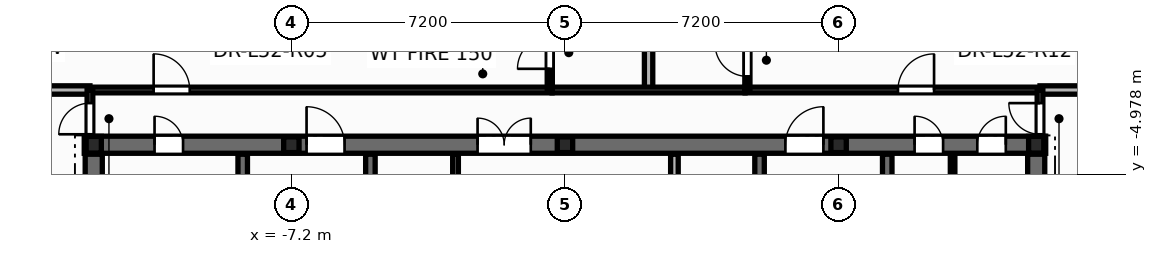
"""IFC4 building model, lengths in metres.
Left out: names, types, materials, properties, quantities, classifications, styles, units other than length and angle.
Written with IfcOpenShell. Run it as: python <this file> out.ifc"""

import sys

from ifc_helpers import new_model, si_unit, direction, frame, frame_2d, origin, origin_2d, place, context, subcontext, project, spatial, rectangle, i_section, extrude, element, fill, save


model = new_model("IFC4")
c1 = context("Model", 3, precision=1e-05, world=origin(), true_north=direction((0.0, 1.0)))
c2 = subcontext(c1, "Body", "Model", "MODEL_VIEW")
j1 = project(units=[si_unit("LENGTHUNIT", "METRE"), si_unit("PLANEANGLEUNIT", "RADIAN")], contexts=[c1])
p1 = place(None, origin())
s1 = spatial("IfcSite", under=j1, at=p1, CompositionType="ELEMENT")
p2 = place(p1, origin())
s2 = spatial("IfcBuilding", under=s1, at=p2, CompositionType="ELEMENT")
p3 = place(p2, frame((0.0, 0.0, 200.1)))
s3 = spatial("IfcBuildingStorey", under=s2, at=p3, CompositionType="ELEMENT", Elevation=200.1)
for number, where, z_axis, x_axis in (
    (1, (12.4, -4.2, 0.0), (0.0, 0.0, 1.0), (1.0, 0.0, 0.0)),
    (2, (-12.4, -4.2, 0.0), (0.0, 0.0, 1.0), (1.0, 0.0, 0.0)),
):
    element("IfcColumn", number, at=place(p3, frame(where, z_axis=z_axis, x_axis=x_axis)), inside=s3, PredefinedType="COLUMN", context=c2, shape_type="SweptSolid", body=[
        extrude(i_section(OverallWidth=0.4, OverallDepth=0.44, WebThickness=0.028, FlangeThickness=0.04, at=origin_2d()), origin(), (0.0, 0.0, 1.0), 3.6),
    ])
for number, where, z_axis, x_axis in (
    (3, (-7.2, -4.2, 0.0), (0.0, 0.0, 1.0), (1.0, 0.0, 0.0)),
    (4, (0.0, -4.2, 0.0), (0.0, 0.0, 1.0), (1.0, 0.0, 0.0)),
    (5, (7.2, -4.2, 0.0), (0.0, 0.0, 1.0), (1.0, 0.0, 0.0)),
):
    element("IfcColumn", number, at=place(p3, frame(where, z_axis=z_axis, x_axis=x_axis)), inside=s3, PredefinedType="PILASTER", context=c2, shape_type="SweptSolid", body=[
        extrude(i_section(OverallWidth=0.405, OverallDepth=0.414, WebThickness=0.022, FlangeThickness=0.032, at=origin_2d()), origin(), (0.0, 0.0, 1.0), 3.6),
    ])
p4 = place(p3, frame((-2.88, -5.6, 0.0), z_axis=(0.0, 0.0, 1.0), x_axis=(0.0, 1.0, 0.0)))
e6 = element("IfcWall", 6, at=p4, inside=s3, PredefinedType="PARTITIONING", context=c2, shape_type="SweptSolid", body=[
    extrude(rectangle(XDim=1.15, YDim=0.15, at=frame_2d((0.575, 0.0))), origin(), (0.0, 0.0, 1.0), 3.345),
])
p5 = place(p3, frame((10.2, -5.52, 0.0), z_axis=(0.0, 0.0, 1.0), x_axis=(0.0, 1.0, 0.0)))
e7 = element("IfcWall", 7, at=p5, inside=s3, PredefinedType="PARTITIONING", context=c2, shape_type="SweptSolid", body=[
    extrude(rectangle(XDim=1.12, YDim=0.12, at=frame_2d((0.56, 0.0))), origin(), (0.0, 0.0, 1.0), 3.345),
])
p6 = place(p3, frame((-12.65, -4.2, 0.0), z_axis=(0.0, 0.0, 1.0), x_axis=(1.0, 0.0, 0.0)))
e8 = element("IfcWall", 8, at=p6, inside=s3, PredefinedType="SHEAR", context=c2, shape_type="SweptSolid", body=[
    extrude(rectangle(XDim=25.3, YDim=0.45, at=frame_2d((12.65, 0.0))), origin(), (0.0, 0.0, 1.0), 3.6),
])
p7 = place(p6, frame((1.85, 0.0, 0.0)))
e9 = element("IfcOpeningElement", 9, at=p7, cuts=e8, PredefinedType="OPENING", context=c2, shape_type="SweptSolid", body=[
    extrude(rectangle(XDim=0.756, YDim=2.054, at=frame_2d((0.375, 1.027))), frame((0.0, 0.235, 0.0), z_axis=(0.0, -1.0, 0.0), x_axis=(1.0, 0.0, 0.0)), (0.0, 0.0, 1.0), 0.47),
])
p8 = place(p6, frame((21.85, 0.0, 0.0)))
e10 = element("IfcOpeningElement", 10, at=p8, cuts=e8, PredefinedType="OPENING", context=c2, shape_type="SweptSolid", body=[
    extrude(rectangle(XDim=0.756, YDim=2.054, at=frame_2d((0.375, 1.027))), frame((0.0, 0.235, 0.0), z_axis=(0.0, -1.0, 0.0), x_axis=(1.0, 0.0, 0.0)), (0.0, 0.0, 1.0), 0.47),
])
p9 = place(p6, frame((23.5, 0.0, 0.0)))
e11 = element("IfcOpeningElement", 11, at=p9, cuts=e8, PredefinedType="OPENING", context=c2, shape_type="SweptSolid", body=[
    extrude(rectangle(XDim=0.756, YDim=2.054, at=frame_2d((0.375, 1.027))), frame((0.0, 0.235, 0.0), z_axis=(0.0, -1.0, 0.0), x_axis=(1.0, 0.0, 0.0)), (0.0, 0.0, 1.0), 0.47),
])
p10 = place(p6, frame((5.85, 0.0, 0.0)))
e12 = element("IfcOpeningElement", 12, at=p10, cuts=e8, PredefinedType="OPENING", context=c2, shape_type="SweptSolid", body=[
    extrude(rectangle(XDim=1.006, YDim=2.104, at=frame_2d((0.5, 1.052))), frame((0.0, 0.235, 0.0), z_axis=(0.0, -1.0, 0.0), x_axis=(1.0, 0.0, 0.0)), (0.0, 0.0, 1.0), 0.47),
])
p11 = place(p6, frame((10.35, 0.0, 0.0)))
e13 = element("IfcOpeningElement", 13, at=p11, cuts=e8, PredefinedType="OPENING", context=c2, shape_type="SweptSolid", body=[
    extrude(rectangle(XDim=1.406, YDim=2.154, at=frame_2d((0.7, 1.077))), frame((0.0, 0.235, 0.0), z_axis=(0.0, -1.0, 0.0), x_axis=(1.0, 0.0, 0.0)), (0.0, 0.0, 1.0), 0.47),
])
p12 = place(p6, frame((18.45, 0.0, 0.0)))
e14 = element("IfcOpeningElement", 14, at=p12, cuts=e8, PredefinedType="OPENING", context=c2, shape_type="SweptSolid", body=[
    extrude(rectangle(XDim=1.006, YDim=2.104, at=frame_2d((0.5, 1.052))), frame((0.0, 0.235, 0.0), z_axis=(0.0, -1.0, 0.0), x_axis=(1.0, 0.0, 0.0)), (0.0, 0.0, 1.0), 0.47),
])
p13 = place(p3, frame((-8.48, -13.85, 0.0), z_axis=(0.0, 0.0, 1.0), x_axis=(0.0, 1.0, 0.0)))
e15 = element("IfcWall", 15, at=p13, inside=s3, PredefinedType="SHEAR", context=c2, shape_type="SweptSolid", body=[
    extrude(rectangle(XDim=9.4, YDim=0.25, at=frame_2d((4.7, 0.0))), origin(), (0.0, 0.0, 1.0), 3.6),
])
p14 = place(p13, frame((6.95, 0.0, 0.0)))
e16 = element("IfcOpeningElement", 16, at=p14, cuts=e15, PredefinedType="OPENING", context=c2, shape_type="SweptSolid", body=[
    extrude(rectangle(XDim=1.006, YDim=2.104, at=frame_2d((0.5, 1.052))), frame((0.0, 0.135, 0.0), z_axis=(0.0, -1.0, 0.0), x_axis=(1.0, 0.0, 0.0)), (0.0, 0.0, 1.0), 0.27),
])
p15 = place(p3, frame((8.48, -13.85, 0.0), z_axis=(0.0, 0.0, 1.0), x_axis=(0.0, 1.0, 0.0)))
e17 = element("IfcWall", 17, at=p15, inside=s3, PredefinedType="SHEAR", context=c2, shape_type="SweptSolid", body=[
    extrude(rectangle(XDim=9.4, YDim=0.25, at=frame_2d((4.7, 0.0))), origin(), (0.0, 0.0, 1.0), 3.6),
])
p16 = place(p15, frame((6.95, 0.0, 0.0)))
e18 = element("IfcOpeningElement", 18, at=p16, cuts=e17, PredefinedType="OPENING", context=c2, shape_type="SweptSolid", body=[
    extrude(rectangle(XDim=1.006, YDim=2.104, at=frame_2d((0.5, 1.052))), frame((0.0, 0.135, 0.0), z_axis=(0.0, -1.0, 0.0), x_axis=(1.0, 0.0, 0.0)), (0.0, 0.0, 1.0), 0.27),
])
for number, where, z_axis, x_axis in (
    (19, (-5.12, -13.85, 0.0), (0.0, 0.0, 1.0), (0.0, 1.0, 0.0)),
    (20, (5.12, -13.85, 0.0), (0.0, 0.0, 1.0), (0.0, 1.0, 0.0)),
):
    element("IfcWall", number, at=place(p3, frame(where, z_axis=z_axis, x_axis=x_axis)), inside=s3, PredefinedType="SHEAR", context=c2, shape_type="SweptSolid", body=[
        extrude(rectangle(XDim=9.4, YDim=0.25, at=frame_2d((4.7, 0.0))), origin(), (0.0, 0.0, 1.0), 3.6),
    ])
for number, where, z_axis, x_axis in (
    (21, (-12.4, -13.85, 0.0), (0.0, 0.0, 1.0), (0.0, 1.0, 0.0)),
    (22, (12.4, -13.85, 0.0), (0.0, 0.0, 1.0), (0.0, 1.0, 0.0)),
):
    element("IfcWall", number, at=place(p3, frame(where, z_axis=z_axis, x_axis=x_axis)), inside=s3, PredefinedType="SHEAR", context=c2, shape_type="SweptSolid", body=[
        extrude(rectangle(XDim=9.4, YDim=0.45, at=frame_2d((4.7, 0.0))), origin(), (0.0, 0.0, 1.0), 3.6),
    ])
p17 = place(p3, frame((2.88, -9.45, 0.0), z_axis=(0.0, 0.0, 1.0), x_axis=(0.0, 1.0, 0.0)))
e23 = element("IfcWall", 23, at=p17, inside=s3, PredefinedType="SOLIDWALL", context=c2, shape_type="SweptSolid", body=[
    extrude(rectangle(XDim=5.0, YDim=0.2, at=frame_2d((2.5, 0.0))), origin(), (0.0, 0.0, 1.0), 3.345),
])
p18 = place(p17, frame((2.05, 0.0, 0.0)))
e24 = element("IfcOpeningElement", 24, at=p18, cuts=e23, PredefinedType="OPENING", context=c2, shape_type="SweptSolid", body=[
    extrude(rectangle(XDim=0.926, YDim=2.104, at=frame_2d((0.46, 1.052))), frame((0.0, 0.11, 0.0), z_axis=(0.0, -1.0, 0.0), x_axis=(1.0, 0.0, 0.0)), (0.0, 0.0, 1.0), 0.22),
])
p19 = place(p3, frame((-12.5, -2.76, 0.0), z_axis=(0.0, 0.0, 1.0), x_axis=(1.0, 0.0, 0.0)))
e25 = element("IfcWall", 25, at=p19, inside=s3, PredefinedType="PARTITIONING", context=c2, shape_type="SweptSolid", body=[
    extrude(rectangle(XDim=12.16, YDim=0.15, at=frame_2d((6.08, 0.0))), origin(), (0.0, 0.0, 1.0), 2.32),
])
p20 = place(p19, frame((1.676, 0.0, 0.0)))
e26 = element("IfcOpeningElement", 26, at=p20, cuts=e25, PredefinedType="OPENING", context=c2, shape_type="SweptSolid", body=[
    extrude(rectangle(XDim=0.956, YDim=2.104, at=frame_2d((0.475, 1.052))), frame((0.0, 0.085, 0.0), z_axis=(0.0, -1.0, 0.0), x_axis=(1.0, 0.0, 0.0)), (0.0, 0.0, 1.0), 0.17),
])
p21 = place(p3, frame((4.74, -2.76, 0.0), z_axis=(0.0, 0.0, 1.0), x_axis=(1.0, 0.0, 0.0)))
e27 = element("IfcWall", 27, at=p21, inside=s3, PredefinedType="PARTITIONING", context=c2, shape_type="SweptSolid", body=[
    extrude(rectangle(XDim=7.76, YDim=0.15, at=frame_2d((3.88, 0.0))), origin(), (0.0, 0.0, 1.0), 2.32),
])
p22 = place(p21, frame((4.022, 0.0, 0.0)))
e28 = element("IfcOpeningElement", 28, at=p22, cuts=e27, PredefinedType="OPENING", context=c2, shape_type="SweptSolid", body=[
    extrude(rectangle(XDim=0.956, YDim=2.104, at=frame_2d((0.475, 1.052))), frame((0.0, 0.085, 0.0), z_axis=(0.0, -1.0, 0.0), x_axis=(1.0, 0.0, 0.0)), (0.0, 0.0, 1.0), 0.17),
])
p23 = place(p3, frame((2.2, -2.76, 0.0), z_axis=(0.0, 0.0, 1.0), x_axis=(0.0, 1.0, 0.0)))
e29 = element("IfcWall", 29, at=p23, inside=s3, PredefinedType="PARTITIONING", context=c2, shape_type="SweptSolid", body=[
    extrude(rectangle(XDim=10.84, YDim=0.22, at=frame_2d((5.42, 0.0))), origin(), (0.0, 0.0, 1.0), 2.32),
])
p24 = place(p3, frame((-0.4, -2.76, 0.0), z_axis=(0.0, 0.0, 1.0), x_axis=(0.0, 1.0, 0.0)))
e30 = element("IfcWall", 30, at=p24, inside=s3, PredefinedType="PARTITIONING", context=c2, shape_type="SweptSolid", body=[
    extrude(rectangle(XDim=2.92, YDim=0.135, at=frame_2d((1.46, 0.0))), origin(), (0.0, 0.0, 1.0), 3.345),
])
p25 = place(p24, frame((0.558, 0.0, 0.0)))
e31 = element("IfcOpeningElement", 31, at=p25, cuts=e30, PredefinedType="OPENING", context=c2, shape_type="SweptSolid", body=[
    extrude(rectangle(XDim=0.856, YDim=2.104, at=frame_2d((0.425, 1.052))), frame((0.0, 0.078, 0.0), z_axis=(0.0, -1.0, 0.0), x_axis=(1.0, 0.0, 0.0)), (0.0, 0.0, 1.0), 0.155),
])
p26 = place(p3, frame((4.8, -2.76, 0.0), z_axis=(0.0, 0.0, 1.0), x_axis=(0.0, 1.0, 0.0)))
e32 = element("IfcWall", 32, at=p26, inside=s3, PredefinedType="PARTITIONING", context=c2, shape_type="SweptSolid", body=[
    extrude(rectangle(XDim=2.92, YDim=0.135, at=frame_2d((1.46, 0.0))), origin(), (0.0, 0.0, 1.0), 3.345),
])
p27 = place(p26, frame((0.359, 0.0, 0.0)))
e33 = element("IfcOpeningElement", 33, at=p27, cuts=e32, PredefinedType="OPENING", context=c2, shape_type="SweptSolid", body=[
    extrude(rectangle(XDim=0.856, YDim=2.104, at=frame_2d((0.425, 1.052))), frame((0.0, 0.078, 0.0), z_axis=(0.0, -1.0, 0.0), x_axis=(1.0, 0.0, 0.0)), (0.0, 0.0, 1.0), 0.155),
])
p28 = place(p3, frame((-0.338, -2.76, 0.0), z_axis=(0.0, 0.0, 1.0), x_axis=(1.0, 0.0, 0.0)))
e34 = element("IfcWall", 34, at=p28, inside=s3, PredefinedType="PARTITIONING", context=c2, shape_type="SweptSolid", body=[
    extrude(rectangle(XDim=5.076, YDim=0.15, at=frame_2d((2.538, 0.0))), origin(), (0.0, 0.0, 1.0), 2.32),
])
for number, where, z_axis, x_axis in (
    (35, (-15.095, -2.76, 0.0), (0.0, 0.0, 1.0), (1.0, 0.0, 0.0)),
    (36, (12.5, -2.76, 0.0), (0.0, 0.0, 1.0), (1.0, 0.0, 0.0)),
):
    element("IfcWall", number, at=place(p3, frame(where, z_axis=z_axis, x_axis=x_axis)), inside=s3, PredefinedType="PARTITIONING", context=c2, shape_type="SweptSolid", body=[
        extrude(rectangle(XDim=2.595, YDim=0.22, at=frame_2d((1.297, 0.0))), origin(), (0.0, 0.0, 1.0), 2.32),
    ])
p29 = place(p3, frame((-12.5, -4.24, 0.0), z_axis=(0.0, 0.0, 1.0), x_axis=(0.0, 1.0, 0.0)))
e37 = element("IfcWall", 37, at=p29, inside=s3, PredefinedType="PARTITIONING", context=c2, shape_type="SweptSolid", body=[
    extrude(rectangle(XDim=1.48, YDim=0.15, at=frame_2d((0.74, 0.0))), origin(), (0.0, 0.0, 1.0), 2.32),
])
p30 = place(p29, frame((0.315, 0.0, 0.0)))
e38 = element("IfcOpeningElement", 38, at=p30, cuts=e37, PredefinedType="OPENING", context=c2, shape_type="SweptSolid", body=[
    extrude(rectangle(XDim=0.826, YDim=2.104, at=frame_2d((0.41, 1.052))), frame((0.0, 0.085, 0.0), z_axis=(0.0, -1.0, 0.0), x_axis=(1.0, 0.0, 0.0)), (0.0, 0.0, 1.0), 0.17),
])
p31 = place(p3, frame((12.5, -4.24, 0.0), z_axis=(0.0, 0.0, 1.0), x_axis=(0.0, 1.0, 0.0)))
e39 = element("IfcWall", 39, at=p31, inside=s3, PredefinedType="PARTITIONING", context=c2, shape_type="SweptSolid", body=[
    extrude(rectangle(XDim=1.48, YDim=0.15, at=frame_2d((0.74, 0.0))), origin(), (0.0, 0.0, 1.0), 2.32),
])
p32 = place(p31, frame((0.315, 0.0, 0.0)))
e40 = element("IfcOpeningElement", 40, at=p32, cuts=e39, PredefinedType="OPENING", context=c2, shape_type="SweptSolid", body=[
    extrude(rectangle(XDim=0.826, YDim=2.104, at=frame_2d((0.41, 1.052))), frame((0.0, 0.085, 0.0), z_axis=(0.0, -1.0, 0.0), x_axis=(1.0, 0.0, 0.0)), (0.0, 0.0, 1.0), 0.17),
])
p33 = place(p7, origin())
e41 = element("IfcDoor", 41, at=p33, inside=s3, OperationType="SINGLE_SWING_LEFT", PredefinedType="DOOR", context=c2, shape_type="SweptSolid", body=[
    extrude(rectangle(XDim=0.75, YDim=2.05, at=frame_2d((0.375, 1.025))), frame((0.0, 0.025, 0.0), z_axis=(0.0, -1.0, 0.0), x_axis=(1.0, 0.0, 0.0)), (0.0, 0.0, 1.0), 0.05),
])
fill(e9, e41)
p34 = place(p8, origin())
e42 = element("IfcDoor", 42, at=p34, inside=s3, OperationType="SINGLE_SWING_LEFT", PredefinedType="DOOR", context=c2, shape_type="SweptSolid", body=[
    extrude(rectangle(XDim=0.75, YDim=2.05, at=frame_2d((0.375, 1.025))), frame((0.0, 0.025, 0.0), z_axis=(0.0, -1.0, 0.0), x_axis=(1.0, 0.0, 0.0)), (0.0, 0.0, 1.0), 0.05),
])
fill(e10, e42)
p35 = place(p9, origin())
e43 = element("IfcDoor", 43, at=p35, inside=s3, OperationType="SINGLE_SWING_RIGHT", PredefinedType="DOOR", context=c2, shape_type="SweptSolid", body=[
    extrude(rectangle(XDim=0.75, YDim=2.05, at=frame_2d((0.375, 1.025))), frame((0.0, 0.025, 0.0), z_axis=(0.0, -1.0, 0.0), x_axis=(1.0, 0.0, 0.0)), (0.0, 0.0, 1.0), 0.05),
])
fill(e11, e43)
p36 = place(p10, origin())
e44 = element("IfcDoor", 44, at=p36, inside=s3, OperationType="SINGLE_SWING_LEFT", PredefinedType="DOOR", context=c2, shape_type="SweptSolid", body=[
    extrude(rectangle(XDim=1.0, YDim=2.1, at=frame_2d((0.5, 1.05))), frame((0.0, 0.025, 0.0), z_axis=(0.0, -1.0, 0.0), x_axis=(1.0, 0.0, 0.0)), (0.0, 0.0, 1.0), 0.05),
])
fill(e12, e44)
p37 = place(p11, origin())
e45 = element("IfcDoor", 45, at=p37, inside=s3, OperationType="DOUBLE_DOOR_SINGLE_SWING", PredefinedType="DOOR", context=c2, shape_type="SweptSolid", body=[
    extrude(rectangle(XDim=1.4, YDim=2.15, at=frame_2d((0.7, 1.075))), frame((0.0, 0.025, 0.0), z_axis=(0.0, -1.0, 0.0), x_axis=(1.0, 0.0, 0.0)), (0.0, 0.0, 1.0), 0.05),
])
fill(e13, e45)
p38 = place(p12, origin())
e46 = element("IfcDoor", 46, at=p38, inside=s3, OperationType="SINGLE_SWING_RIGHT", PredefinedType="DOOR", context=c2, shape_type="SweptSolid", body=[
    extrude(rectangle(XDim=1.0, YDim=2.1, at=frame_2d((0.5, 1.05))), frame((0.0, 0.025, 0.0), z_axis=(0.0, -1.0, 0.0), x_axis=(1.0, 0.0, 0.0)), (0.0, 0.0, 1.0), 0.05),
])
fill(e14, e46)
p39 = place(p30, origin())
e47 = element("IfcDoor", 47, at=p39, inside=s3, OperationType="SINGLE_SWING_LEFT", PredefinedType="DOOR", context=c2, shape_type="SweptSolid", body=[
    extrude(rectangle(XDim=0.82, YDim=2.1, at=frame_2d((0.41, 1.05))), frame((0.0, 0.025, 0.0), z_axis=(0.0, -1.0, 0.0), x_axis=(1.0, 0.0, 0.0)), (0.0, 0.0, 1.0), 0.05),
])
fill(e38, e47)
p40 = place(p32, origin())
e48 = element("IfcDoor", 48, at=p40, inside=s3, OperationType="SINGLE_SWING_RIGHT", PredefinedType="DOOR", context=c2, shape_type="SweptSolid", body=[
    extrude(rectangle(XDim=0.82, YDim=2.1, at=frame_2d((0.41, 1.05))), frame((0.0, 0.025, 0.0), z_axis=(0.0, -1.0, 0.0), x_axis=(1.0, 0.0, 0.0)), (0.0, 0.0, 1.0), 0.05),
])
fill(e40, e48)
p41 = place(p25, origin())
e49 = element("IfcDoor", 49, at=p41, inside=s3, OperationType="SINGLE_SWING_LEFT", PredefinedType="DOOR", context=c2, shape_type="SweptSolid", body=[
    extrude(rectangle(XDim=0.85, YDim=2.1, at=frame_2d((0.425, 1.05))), frame((0.0, 0.025, 0.0), z_axis=(0.0, -1.0, 0.0), x_axis=(1.0, 0.0, 0.0)), (0.0, 0.0, 1.0), 0.05),
])
fill(e31, e49)
p42 = place(p20, origin())
e50 = element("IfcDoor", 50, at=p42, inside=s3, OperationType="SINGLE_SWING_LEFT", PredefinedType="DOOR", context=c2, shape_type="SweptSolid", body=[
    extrude(rectangle(XDim=0.95, YDim=2.1, at=frame_2d((0.475, 1.05))), frame((0.0, 0.025, 0.0), z_axis=(0.0, -1.0, 0.0), x_axis=(1.0, 0.0, 0.0)), (0.0, 0.0, 1.0), 0.05),
])
fill(e26, e50)
p43 = place(p27, origin())
e51 = element("IfcDoor", 51, at=p43, inside=s3, OperationType="SINGLE_SWING_RIGHT", PredefinedType="DOOR", context=c2, shape_type="SweptSolid", body=[
    extrude(rectangle(XDim=0.85, YDim=2.1, at=frame_2d((0.425, 1.05))), frame((0.0, 0.025, 0.0), z_axis=(0.0, -1.0, 0.0), x_axis=(1.0, 0.0, 0.0)), (0.0, 0.0, 1.0), 0.05),
])
fill(e33, e51)
p44 = place(p22, origin())
e52 = element("IfcDoor", 52, at=p44, inside=s3, OperationType="SINGLE_SWING_RIGHT", PredefinedType="DOOR", context=c2, shape_type="SweptSolid", body=[
    extrude(rectangle(XDim=0.95, YDim=2.1, at=frame_2d((0.475, 1.05))), frame((0.0, 0.025, 0.0), z_axis=(0.0, -1.0, 0.0), x_axis=(1.0, 0.0, 0.0)), (0.0, 0.0, 1.0), 0.05),
])
fill(e28, e52)
save(model, sys.argv[1])
